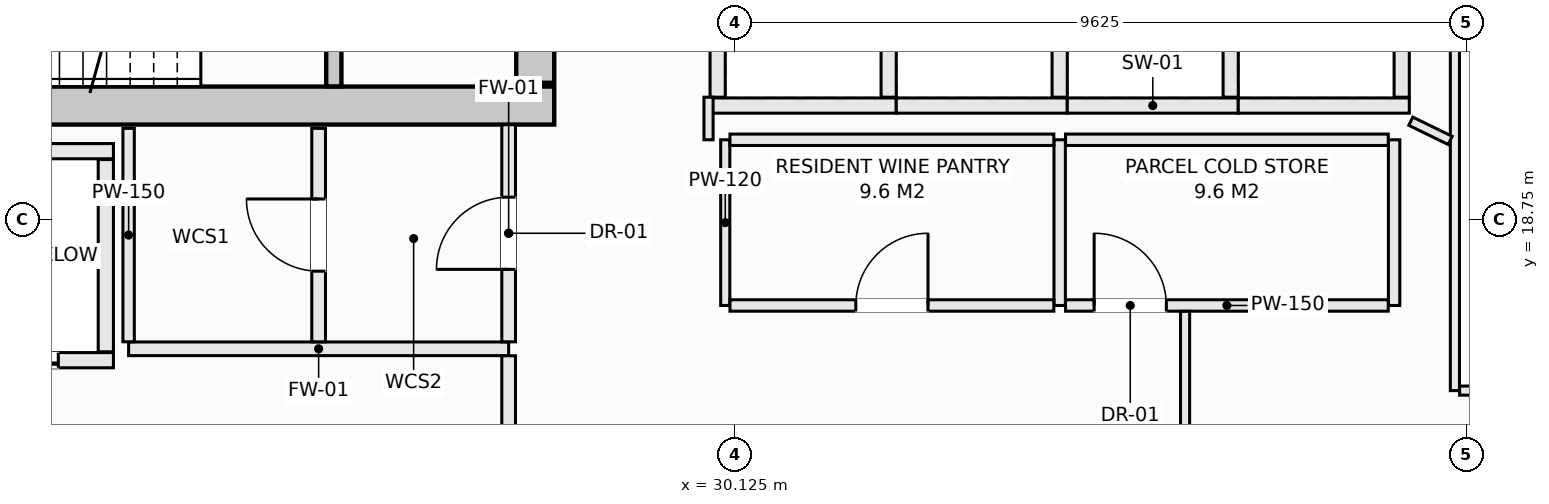
"""IFC4 building model, lengths in metres.
Left out: names, types, materials, properties, quantities, classifications, styles, units other than length and angle.
Written with IfcOpenShell. Run it as: python <this file> out.ifc"""

import sys

from ifc_helpers import new_model, si_unit, direction, frame, frame_2d, origin, place, context, subcontext, project, spatial, rectangle, extrude, element, fill, save


model = new_model("IFC4")
c1 = context("Model", 3, precision=1e-05, world=origin(), true_north=direction((0.0, 1.0)))
c2 = subcontext(c1, "Body", "Model", "MODEL_VIEW")
j1 = project(units=[si_unit("LENGTHUNIT", "METRE"), si_unit("PLANEANGLEUNIT", "RADIAN")], contexts=[c1])
p1 = place(None, origin())
s1 = spatial("IfcSite", under=j1, at=p1, CompositionType="ELEMENT")
p2 = place(p1, origin())
s2 = spatial("IfcBuilding", under=s1, at=p2, CompositionType="ELEMENT")
p3 = place(p2, frame((0.0, 0.0, 216.2)))
s3 = spatial("IfcBuildingStorey", under=s2, at=p3, CompositionType="ELEMENT", Elevation=216.2)
p4 = place(p3, frame((14.25, 20.25, -0.27), z_axis=(0.0, 0.0, 1.0), x_axis=(1.0, 0.0, 0.0)))
e1 = element("IfcWall", 1, at=p4, inside=s3, PredefinedType="SHEAR", context=c2, shape_type="SweptSolid", body=[
    extrude(rectangle(XDim=13.5, YDim=0.5, at=frame_2d((6.75, 0.0))), origin(), (0.0, 0.0, 1.0), 3.3),
])
p5 = place(p3, frame((27.5, 20.55, -0.27), z_axis=(0.0, 0.0, 1.0), x_axis=(0.0, 1.0, 0.0)))
e2 = element("IfcWall", 2, at=p5, inside=s3, PredefinedType="SHEAR", context=c2, shape_type="SweptSolid", body=[
    extrude(rectangle(XDim=1.5, YDim=0.5, at=frame_2d((0.75, 0.0))), origin(), (0.0, 0.0, 1.0), 3.3),
])
p6 = place(p3, frame((24.85, 20.502, -0.27), z_axis=(0.0, 0.0, 1.0), x_axis=(0.0, 1.0, 0.0)))
e3 = element("IfcWall", 3, at=p6, inside=s3, PredefinedType="SHEAR", context=c2, shape_type="SweptSolid", body=[
    extrude(rectangle(XDim=3.038, YDim=0.2, at=frame_2d((1.519, 0.0))), origin(), (0.0, 0.0, 1.0), 3.3),
])
p7 = place(p6, frame((0.969, 0.0, 0.27)))
e4 = element("IfcOpeningElement", 4, at=p7, cuts=e3, PredefinedType="OPENING", context=c2, shape_type="SweptSolid", body=[
    extrude(rectangle(XDim=1.1, YDim=2.15, at=frame_2d((0.55, 1.075))), frame((0.0, 0.11, 0.0), z_axis=(0.0, -1.0, 0.0), x_axis=(1.0, 0.0, 0.0)), (0.0, 0.0, 1.0), 0.22),
])
p8 = place(p3, frame((19.4, 19.65, 0.0), z_axis=(0.0, 0.0, 1.0), x_axis=(1.0, 0.0, 0.0)))
e5 = element("IfcWall", 5, at=p8, inside=s3, PredefinedType="SOLIDWALL", context=c2, shape_type="SweptSolid", body=[
    extrude(rectangle(XDim=2.55, YDim=0.2, at=frame_2d((1.275, 0.0))), origin(), (0.0, 0.0, 1.0), 3.03),
])
p9 = place(p3, frame((19.4, 16.9, 0.0), z_axis=(0.0, 0.0, 1.0), x_axis=(1.0, 0.0, 0.0)))
e6 = element("IfcWall", 6, at=p9, inside=s3, PredefinedType="SOLIDWALL", context=c2, shape_type="SweptSolid", body=[
    extrude(rectangle(XDim=2.55, YDim=0.2, at=frame_2d((1.275, 0.0))), origin(), (0.0, 0.0, 1.0), 3.03),
])
p10 = place(p9, frame((0.725, 0.0, 0.0)))
e7 = element("IfcOpeningElement", 7, at=p10, cuts=e6, PredefinedType="OPENING", context=c2, shape_type="SweptSolid", body=[
    extrude(rectangle(XDim=1.1, YDim=2.2, at=frame_2d((0.55, 1.1))), frame((0.0, 0.11, 0.0), z_axis=(0.0, -1.0, 0.0), x_axis=(1.0, 0.0, 0.0)), (0.0, 0.0, 1.0), 0.22),
])
p11 = place(p3, frame((21.85, 17.01, 0.0), z_axis=(0.0, 0.0, 1.0), x_axis=(0.0, 1.0, 0.0)))
e8 = element("IfcWall", 8, at=p11, inside=s3, PredefinedType="SOLIDWALL", context=c2, shape_type="SweptSolid", body=[
    extrude(rectangle(XDim=2.53, YDim=0.2, at=frame_2d((1.265, 0.0))), origin(), (0.0, 0.0, 1.0), 3.03),
])
p12 = place(p3, frame((29.8, 20.25, 0.0), z_axis=(0.0, 0.0, 1.0), x_axis=(1.0, 0.0, 0.0)))
e9 = element("IfcWall", 9, at=p12, inside=s3, PredefinedType="SOLIDWALL", context=c2, shape_type="SweptSolid", body=[
    extrude(rectangle(XDim=2.45, YDim=0.2, at=frame_2d((1.225, 0.0))), origin(), (0.0, 0.0, 1.0), 3.03),
])
for number, where, z_axis, x_axis in (
    (10, (29.9, 20.36, 0.0), (0.0, 0.0, 1.0), (0.0, 1.0, 0.0)),
    (11, (32.15, 20.36, 0.0), (0.0, 0.0, 1.0), (0.0, 1.0, 0.0)),
):
    element("IfcWall", number, at=place(p3, frame(where, z_axis=z_axis, x_axis=x_axis)), inside=s3, PredefinedType="SOLIDWALL", context=c2, shape_type="SweptSolid", body=[
        extrude(rectangle(XDim=2.43, YDim=0.2, at=frame_2d((1.215, 0.0))), origin(), (0.0, 0.0, 1.0), 3.03),
    ])
p13 = place(p3, frame((32.25, 20.25, 0.0), z_axis=(0.0, 0.0, 1.0), x_axis=(1.0, 0.0, 0.0)))
e12 = element("IfcWall", 12, at=p13, inside=s3, PredefinedType="SOLIDWALL", context=c2, shape_type="SweptSolid", body=[
    extrude(rectangle(XDim=2.25, YDim=0.2, at=frame_2d((1.125, 0.0))), origin(), (0.0, 0.0, 1.0), 3.03),
])
p14 = place(p3, frame((34.4, 20.36, 0.0), z_axis=(0.0, 0.0, 1.0), x_axis=(0.0, 1.0, 0.0)))
e13 = element("IfcWall", 13, at=p14, inside=s3, PredefinedType="SOLIDWALL", context=c2, shape_type="SweptSolid", body=[
    extrude(rectangle(XDim=2.43, YDim=0.2, at=frame_2d((1.215, 0.0))), origin(), (0.0, 0.0, 1.0), 3.03),
])
p15 = place(p3, frame((34.5, 20.25, 0.0), z_axis=(0.0, 0.0, 1.0), x_axis=(1.0, 0.0, 0.0)))
e14 = element("IfcWall", 14, at=p15, inside=s3, PredefinedType="SOLIDWALL", context=c2, shape_type="SweptSolid", body=[
    extrude(rectangle(XDim=2.25, YDim=0.2, at=frame_2d((1.125, 0.0))), origin(), (0.0, 0.0, 1.0), 3.03),
])
p16 = place(p3, frame((36.65, 20.36, 0.0), z_axis=(0.0, 0.0, 1.0), x_axis=(0.0, 1.0, 0.0)))
e15 = element("IfcWall", 15, at=p16, inside=s3, PredefinedType="SOLIDWALL", context=c2, shape_type="SweptSolid", body=[
    extrude(rectangle(XDim=2.43, YDim=0.2, at=frame_2d((1.215, 0.0))), origin(), (0.0, 0.0, 1.0), 3.03),
])
p17 = place(p3, frame((36.75, 20.25, 0.0), z_axis=(0.0, 0.0, 1.0), x_axis=(1.0, 0.0, 0.0)))
e16 = element("IfcWall", 16, at=p17, inside=s3, PredefinedType="SOLIDWALL", context=c2, shape_type="SweptSolid", body=[
    extrude(rectangle(XDim=2.25, YDim=0.2, at=frame_2d((1.125, 0.0))), origin(), (0.0, 0.0, 1.0), 3.03),
])
p18 = place(p3, frame((38.9, 20.36, 0.0), z_axis=(0.0, 0.0, 1.0), x_axis=(0.0, 1.0, 0.0)))
e17 = element("IfcWall", 17, at=p18, inside=s3, PredefinedType="SOLIDWALL", context=c2, shape_type="SweptSolid", body=[
    extrude(rectangle(XDim=2.43, YDim=0.2, at=frame_2d((1.215, 0.0))), origin(), (0.0, 0.0, 1.0), 3.03),
])
p19 = place(p3, frame((22.15, 17.05, 0.0), z_axis=(0.0, 0.0, 1.0), x_axis=(1.0, 0.0, 0.0)))
e18 = element("IfcWall", 18, at=p19, inside=s3, PredefinedType="SOLIDWALL", context=c2, shape_type="SweptSolid", body=[
    extrude(rectangle(XDim=5.0, YDim=0.18, at=frame_2d((2.5, 0.0))), origin(), (0.0, 0.0, 1.0), 3.03),
])
p20 = place(p3, frame((22.15, 17.142, 0.0), z_axis=(0.0, 0.0, 1.0), x_axis=(0.0, 1.0, 0.0)))
e19 = element("IfcWall", 19, at=p20, inside=s3, PredefinedType="PARTITIONING", context=c2, shape_type="SweptSolid", body=[
    extrude(rectangle(XDim=2.808, YDim=0.15, at=frame_2d((1.404, 0.0))), origin(), (0.0, 0.0, 1.0), 3.03),
])
p21 = place(p3, frame((24.65, 17.142, 0.0), z_axis=(0.0, 0.0, 1.0), x_axis=(0.0, 1.0, 0.0)))
e20 = element("IfcWall", 20, at=p21, inside=s3, PredefinedType="SOLIDWALL", context=c2, shape_type="SweptSolid", body=[
    extrude(rectangle(XDim=2.808, YDim=0.18, at=frame_2d((1.404, 0.0))), origin(), (0.0, 0.0, 1.0), 3.03),
])
p22 = place(p21, frame((0.929, 0.0, 0.0)))
e21 = element("IfcOpeningElement", 21, at=p22, cuts=e20, PredefinedType="OPENING", context=c2, shape_type="SweptSolid", body=[
    extrude(rectangle(XDim=0.95, YDim=2.1, at=frame_2d((0.475, 1.05))), frame((0.0, 0.1, 0.0), z_axis=(0.0, -1.0, 0.0), x_axis=(1.0, 0.0, 0.0)), (0.0, 0.0, 1.0), 0.2),
])
p23 = place(p3, frame((27.15, 11.113, 0.0), z_axis=(0.0, 0.0, 1.0), x_axis=(0.0, 1.0, 0.0)))
e22 = element("IfcWall", 22, at=p23, inside=s3, PredefinedType="SOLIDWALL", context=c2, shape_type="SweptSolid", body=[
    extrude(rectangle(XDim=5.845, YDim=0.18, at=frame_2d((2.922, 0.0))), origin(), (0.0, 0.0, 1.0), 3.03),
])
p24 = place(p23, frame((3.258, 0.0, 0.0)))
e23 = element("IfcOpeningElement", 23, at=p24, cuts=e22, PredefinedType="OPENING", context=c2, shape_type="SweptSolid", body=[
    extrude(rectangle(XDim=0.95, YDim=2.1, at=frame_2d((0.475, 1.05))), frame((0.0, 0.1, 0.0), z_axis=(0.0, -1.0, 0.0), x_axis=(1.0, 0.0, 0.0)), (0.0, 0.0, 1.0), 0.2),
])
p25 = place(p3, frame((27.15, 17.142, 0.0), z_axis=(0.0, 0.0, 1.0), x_axis=(0.0, 1.0, 0.0)))
e24 = element("IfcWall", 24, at=p25, inside=s3, PredefinedType="SOLIDWALL", context=c2, shape_type="SweptSolid", body=[
    extrude(rectangle(XDim=2.856, YDim=0.18, at=frame_2d((1.428, 0.0))), origin(), (0.0, 0.0, 1.0), 3.03),
])
p26 = place(p25, frame((0.953, 0.0, 0.0)))
e25 = element("IfcOpeningElement", 25, at=p26, cuts=e24, PredefinedType="OPENING", context=c2, shape_type="SweptSolid", body=[
    extrude(rectangle(XDim=0.95, YDim=2.1, at=frame_2d((0.475, 1.05))), frame((0.0, 0.1, 0.0), z_axis=(0.0, -1.0, 0.0), x_axis=(1.0, 0.0, 0.0)), (0.0, 0.0, 1.0), 0.2),
])
p27 = place(p3, frame((30.0, 17.62, 0.0), z_axis=(0.0, 0.0, 1.0), x_axis=(0.0, 1.0, 0.0)))
e26 = element("IfcWall", 26, at=p27, inside=s3, PredefinedType="PARTITIONING", context=c2, shape_type="SweptSolid", body=[
    extrude(rectangle(XDim=2.18, YDim=0.12, at=frame_2d((1.09, 0.0))), origin(), (0.0, 0.0, 1.0), 3.03),
])
for number, where, z_axis, x_axis in (
    (27, (38.8, 17.62, 0.0), (0.0, 0.0, 1.0), (0.0, 1.0, 0.0)),
    (28, (34.4, 17.62, 0.0), (0.0, 0.0, 1.0), (0.0, 1.0, 0.0)),
):
    element("IfcWall", number, at=place(p3, frame(where, z_axis=z_axis, x_axis=x_axis)), inside=s3, PredefinedType="PARTITIONING", context=c2, shape_type="SweptSolid", body=[
        extrude(rectangle(XDim=2.18, YDim=0.15, at=frame_2d((1.09, 0.0))), origin(), (0.0, 0.0, 1.0), 3.03),
    ])
p28 = place(p3, frame((30.062, 17.62, 0.0), z_axis=(0.0, 0.0, 1.0), x_axis=(1.0, 0.0, 0.0)))
e29 = element("IfcWall", 29, at=p28, inside=s3, PredefinedType="PARTITIONING", context=c2, shape_type="SweptSolid", body=[
    extrude(rectangle(XDim=4.261, YDim=0.15, at=frame_2d((2.13, 0.0))), origin(), (0.0, 0.0, 1.0), 3.03),
])
p29 = place(p28, frame((1.656, 0.0, 0.0)))
e30 = element("IfcOpeningElement", 30, at=p29, cuts=e29, PredefinedType="OPENING", context=c2, shape_type="SweptSolid", body=[
    extrude(rectangle(XDim=0.95, YDim=2.1, at=frame_2d((0.475, 1.05))), frame((0.0, 0.085, 0.0), z_axis=(0.0, -1.0, 0.0), x_axis=(1.0, 0.0, 0.0)), (0.0, 0.0, 1.0), 0.17),
])
p30 = place(p3, frame((34.477, 17.62, 0.0), z_axis=(0.0, 0.0, 1.0), x_axis=(1.0, 0.0, 0.0)))
e31 = element("IfcWall", 31, at=p30, inside=s3, PredefinedType="PARTITIONING", context=c2, shape_type="SweptSolid", body=[
    extrude(rectangle(XDim=4.246, YDim=0.15, at=frame_2d((2.123, 0.0))), origin(), (0.0, 0.0, 1.0), 3.03),
])
p31 = place(p30, frame((0.376, 0.0, 0.0)))
e32 = element("IfcOpeningElement", 32, at=p31, cuts=e31, PredefinedType="OPENING", context=c2, shape_type="SweptSolid", body=[
    extrude(rectangle(XDim=0.95, YDim=2.1, at=frame_2d((0.475, 1.05))), frame((0.0, 0.085, 0.0), z_axis=(0.0, -1.0, 0.0), x_axis=(1.0, 0.0, 0.0)), (0.0, 0.0, 1.0), 0.17),
])
p32 = place(p3, frame((30.062, 19.8, 0.0), z_axis=(0.0, 0.0, 1.0), x_axis=(1.0, 0.0, 0.0)))
e33 = element("IfcWall", 33, at=p32, inside=s3, PredefinedType="PARTITIONING", context=c2, shape_type="SweptSolid", body=[
    extrude(rectangle(XDim=4.261, YDim=0.15, at=frame_2d((2.13, 0.0))), origin(), (0.0, 0.0, 1.0), 3.03),
])
p33 = place(p3, frame((34.477, 19.8, 0.0), z_axis=(0.0, 0.0, 1.0), x_axis=(1.0, 0.0, 0.0)))
e34 = element("IfcWall", 34, at=p33, inside=s3, PredefinedType="PARTITIONING", context=c2, shape_type="SweptSolid", body=[
    extrude(rectangle(XDim=4.246, YDim=0.15, at=frame_2d((2.123, 0.0))), origin(), (0.0, 0.0, 1.0), 3.03),
])
p34 = place(p3, frame((39.6, 16.5, 0.0), z_axis=(0.0, 0.0, 1.0), x_axis=(0.0, 1.0, 0.0)))
e35 = element("IfcWall", 35, at=p34, inside=s3, PredefinedType="PARTITIONING", context=c2, shape_type="SweptSolid", body=[
    extrude(rectangle(XDim=6.52, YDim=0.12, at=frame_2d((3.26, 0.0))), origin(), (0.0, 0.0, 1.0), 2.478),
])
p35 = place(p3, frame((39.662, 16.5, 0.0), z_axis=(0.0, 0.0, 1.0), x_axis=(1.0, 0.0, 0.0)))
e36 = element("IfcWall", 36, at=p35, inside=s3, PredefinedType="PARTITIONING", context=c2, shape_type="SweptSolid", body=[
    extrude(rectangle(XDim=3.495, YDim=0.12, at=frame_2d((1.748, 0.0))), origin(), (0.0, 0.0, 1.0), 2.77),
])
p36 = place(p35, frame((1.272, 0.0, 0.0)))
e37 = element("IfcOpeningElement", 37, at=p36, cuts=e36, PredefinedType="OPENING", context=c2, shape_type="SweptSolid", body=[
    extrude(rectangle(XDim=0.95, YDim=2.1, at=frame_2d((0.475, 1.05))), frame((0.0, 0.07, 0.0), z_axis=(0.0, -1.0, 0.0), x_axis=(1.0, 0.0, 0.0)), (0.0, 0.0, 1.0), 0.14),
])
p37 = place(p3, frame((29.78, 19.8, 0.0), z_axis=(0.0, 0.0, 1.0), x_axis=(0.0, 1.0, 0.0)))
e38 = element("IfcWall", 38, at=p37, inside=s3, PredefinedType="PARTITIONING", context=c2, shape_type="SweptSolid", body=[
    extrude(rectangle(XDim=0.56, YDim=0.12, at=frame_2d((0.28, 0.0))), origin(), (0.0, 0.0, 1.0), 3.03),
])
p38 = place(p3, frame((36.05, 14.95, 0.0), z_axis=(0.0, 0.0, 1.0), x_axis=(0.0, 1.0, 0.0)))
e39 = element("IfcWall", 39, at=p38, inside=s3, PredefinedType="PARTITIONING", context=c2, shape_type="SweptSolid", body=[
    extrude(rectangle(XDim=2.593, YDim=0.12, at=frame_2d((1.296, 0.0))), origin(), (0.0, 0.0, 1.0), 3.03),
])
p39 = place(p3, frame((39.02, 20.044, 0.0), z_axis=(0.0, 0.0, 1.0), x_axis=(0.898788798226, -0.438381906769, 0.0)))
e40 = element("IfcWall", 40, at=p39, inside=s3, PredefinedType="PARTITIONING", context=c2, shape_type="SweptSolid", body=[
    extrude(rectangle(XDim=0.576, YDim=0.12, at=frame_2d((0.288, 0.0))), origin(), (0.0, 0.0, 1.0), 3.03),
])
p40 = place(p10, origin())
e41 = element("IfcDoor", 41, at=p40, inside=s3, OperationType="SLIDING_TO_LEFT", PredefinedType="DOOR", context=c2, shape_type="SweptSolid", body=[
    extrude(rectangle(XDim=1.1, YDim=2.2, at=frame_2d((0.55, 1.1))), frame((0.0, 0.025, 0.0), z_axis=(0.0, -1.0, 0.0), x_axis=(1.0, 0.0, 0.0)), (0.0, 0.0, 1.0), 0.05),
])
fill(e7, e41)
p41 = place(p26, origin())
e42 = element("IfcDoor", 42, at=p41, inside=s3, OperationType="SINGLE_SWING_LEFT", PredefinedType="DOOR", context=c2, shape_type="SweptSolid", body=[
    extrude(rectangle(XDim=0.95, YDim=2.1, at=frame_2d((0.475, 1.05))), frame((0.0, 0.025, 0.0), z_axis=(0.0, -1.0, 0.0), x_axis=(1.0, 0.0, 0.0)), (0.0, 0.0, 1.0), 0.05),
])
fill(e25, e42)
p42 = place(p29, origin())
e43 = element("IfcDoor", 43, at=p42, inside=s3, OperationType="SINGLE_SWING_RIGHT", PredefinedType="DOOR", context=c2, shape_type="SweptSolid", body=[
    extrude(rectangle(XDim=0.95, YDim=2.1, at=frame_2d((0.475, 1.05))), frame((0.0, 0.025, 0.0), z_axis=(0.0, -1.0, 0.0), x_axis=(1.0, 0.0, 0.0)), (0.0, 0.0, 1.0), 0.05),
])
fill(e30, e43)
p43 = place(p31, origin())
e44 = element("IfcDoor", 44, at=p43, inside=s3, OperationType="SINGLE_SWING_LEFT", PredefinedType="DOOR", context=c2, shape_type="SweptSolid", body=[
    extrude(rectangle(XDim=0.95, YDim=2.1, at=frame_2d((0.475, 1.05))), frame((0.0, 0.025, 0.0), z_axis=(0.0, -1.0, 0.0), x_axis=(1.0, 0.0, 0.0)), (0.0, 0.0, 1.0), 0.05),
])
fill(e32, e44)
p44 = place(p22, origin())
e45 = element("IfcDoor", 45, at=p44, inside=s3, OperationType="SINGLE_SWING_RIGHT", PredefinedType="DOOR", context=c2, shape_type="SweptSolid", body=[
    extrude(rectangle(XDim=0.95, YDim=2.1, at=frame_2d((0.475, 1.05))), frame((0.0, 0.025, 0.0), z_axis=(0.0, -1.0, 0.0), x_axis=(1.0, 0.0, 0.0)), (0.0, 0.0, 1.0), 0.05),
])
fill(e21, e45)
save(model, sys.argv[1])
